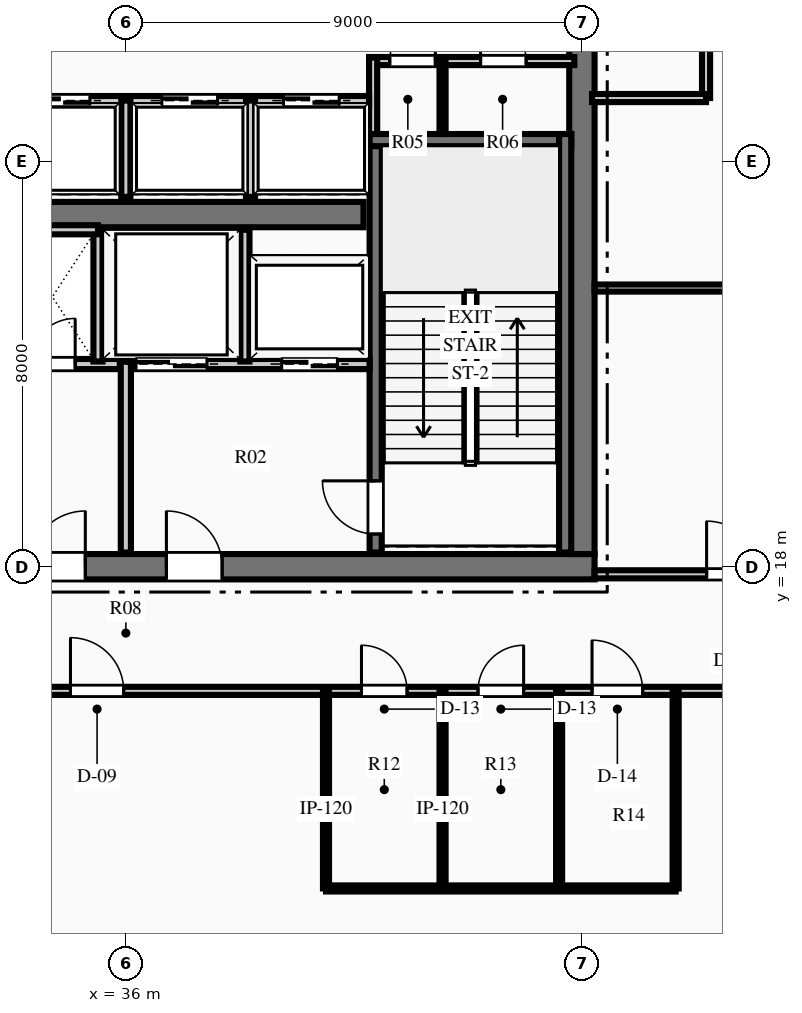
"""IFC4 building model, lengths in metres.
Left out: names, types, materials, properties, quantities, classifications, styles, units other than length and angle.
Written with IfcOpenShell. Run it as: python <this file> out.ifc"""

import sys

from ifc_helpers import new_model, si_unit, direction, frame, frame_2d, origin, place, context, subcontext, project, spatial, rectangle, extrude, element, fill, save


model = new_model("IFC4")
c1 = context("Model", 3, precision=1e-05, world=origin(), true_north=direction((0.0, 1.0)))
c2 = subcontext(c1, "Body", "Model", "MODEL_VIEW")
j1 = project(units=[si_unit("LENGTHUNIT", "METRE"), si_unit("PLANEANGLEUNIT", "RADIAN")], contexts=[c1])
p1 = place(None, origin())
s1 = spatial("IfcSite", under=j1, at=p1, CompositionType="ELEMENT")
p2 = place(p1, origin())
s2 = spatial("IfcBuilding", under=s1, at=p2, CompositionType="ELEMENT")
p3 = place(p2, frame((0.0, 0.0, 239.7)))
s3 = spatial("IfcBuildingStorey", under=s2, at=p3, CompositionType="ELEMENT", Elevation=239.7)
p4 = place(p3, frame((26.75, 18.0, 0.0), z_axis=(0.0, 0.0, 1.0), x_axis=(1.0, 0.0, 0.0)))
e1 = element("IfcWall", 1, at=p4, inside=s3, PredefinedType="SHEAR", context=c2, shape_type="SweptSolid", body=[
    extrude(rectangle(XDim=18.5, YDim=0.5, at=frame_2d((9.25, 0.0))), origin(), (0.0, 0.0, 1.0), 4.5),
])
p5 = place(p4, frame((7.35, 0.0, 0.0)))
e2 = element("IfcOpeningElement", 2, at=p5, cuts=e1, PredefinedType="OPENING", context=c2, shape_type="SweptSolid", body=[
    extrude(rectangle(XDim=1.1, YDim=2.15, at=frame_2d((0.55, 1.075))), frame((0.0, 0.26, 0.0), z_axis=(0.0, -1.0, 0.0), x_axis=(1.0, 0.0, 0.0)), (0.0, 0.0, 1.0), 0.52),
])
p6 = place(p4, frame((10.05, 0.0, 0.0)))
e3 = element("IfcOpeningElement", 3, at=p6, cuts=e1, PredefinedType="OPENING", context=c2, shape_type="SweptSolid", body=[
    extrude(rectangle(XDim=1.1, YDim=2.15, at=frame_2d((0.55, 1.075))), frame((0.0, 0.26, 0.0), z_axis=(0.0, -1.0, 0.0), x_axis=(1.0, 0.0, 0.0)), (0.0, 0.0, 1.0), 0.52),
])
p7 = place(p3, frame((45.0, 18.25, 0.0), z_axis=(0.0, 0.0, 1.0), x_axis=(0.0, 1.0, 0.0)))
e4 = element("IfcWall", 4, at=p7, inside=s3, PredefinedType="SHEAR", context=c2, shape_type="SweptSolid", body=[
    extrude(rectangle(XDim=15.5, YDim=0.5, at=frame_2d((7.75, 0.0))), origin(), (0.0, 0.0, 1.0), 4.5),
])
p8 = place(p7, frame((9.99, 0.0, 0.0)))
e5 = element("IfcOpeningElement", 5, at=p8, cuts=e4, PredefinedType="OPENING", context=c2, shape_type="SweptSolid", body=[
    extrude(rectangle(XDim=1.4, YDim=2.2, at=frame_2d((0.7, 1.1))), frame((0.0, 0.26, 0.0), z_axis=(0.0, -1.0, 0.0), x_axis=(1.0, 0.0, 0.0)), (0.0, 0.0, 1.0), 0.52),
])
p9 = place(p3, frame((31.31, 24.95, 0.0), z_axis=(0.0, 0.0, 1.0), x_axis=(1.0, 0.0, 0.0)))
e6 = element("IfcWall", 6, at=p9, inside=s3, PredefinedType="SHEAR", context=c2, shape_type="SweptSolid", body=[
    extrude(rectangle(XDim=9.38, YDim=0.5, at=frame_2d((4.69, 0.0))), origin(), (0.0, 0.0, 1.0), 4.5),
])
p10 = place(p3, frame((40.93, 18.28, 0.0), z_axis=(0.0, 0.0, 1.0), x_axis=(0.0, 1.0, 0.0)))
e7 = element("IfcWall", 7, at=p10, inside=s3, PredefinedType="SHEAR", context=c2, shape_type="SweptSolid", body=[
    extrude(rectangle(XDim=8.26, YDim=0.24, at=frame_2d((4.13, 0.0))), origin(), (0.0, 0.0, 1.0), 4.5),
])
p11 = place(p10, frame((0.365, 0.0, 0.0)))
e8 = element("IfcOpeningElement", 8, at=p11, cuts=e7, PredefinedType="OPENING", context=c2, shape_type="SweptSolid", body=[
    extrude(rectangle(XDim=1.05, YDim=2.15, at=frame_2d((0.525, 1.075))), frame((0.0, 0.13, 0.0), z_axis=(0.0, -1.0, 0.0), x_axis=(1.0, 0.0, 0.0)), (0.0, 0.0, 1.0), 0.26),
])
p12 = place(p3, frame((40.81, 26.42, 0.0), z_axis=(0.0, 0.0, 1.0), x_axis=(1.0, 0.0, 0.0)))
e9 = element("IfcWall", 9, at=p12, inside=s3, PredefinedType="SHEAR", context=c2, shape_type="SweptSolid", body=[
    extrude(rectangle(XDim=3.98, YDim=0.24, at=frame_2d((1.99, 0.0))), origin(), (0.0, 0.0, 1.0), 4.5),
])
p13 = place(p3, frame((44.67, 18.28, 0.0), z_axis=(0.0, 0.0, 1.0), x_axis=(0.0, 1.0, 0.0)))
e10 = element("IfcWall", 10, at=p13, inside=s3, PredefinedType="SHEAR", context=c2, shape_type="SweptSolid", body=[
    extrude(rectangle(XDim=8.26, YDim=0.24, at=frame_2d((4.13, 0.0))), origin(), (0.0, 0.0, 1.0), 4.5),
])
p14 = place(p3, frame((36.0, 18.28, 0.0), z_axis=(0.0, 0.0, 1.0), x_axis=(0.0, 1.0, 0.0)))
e11 = element("IfcWall", 11, at=p14, inside=s3, PredefinedType="PARTITIONING", context=c2, shape_type="SweptSolid", body=[
    extrude(rectangle(XDim=3.77, YDim=0.2, at=frame_2d((1.885, 0.0))), origin(), (0.0, 0.0, 1.0), 4.1),
])
p15 = place(p3, frame((31.19, 22.0, 0.0), z_axis=(0.0, 0.0, 1.0), x_axis=(1.0, 0.0, 0.0)))
e12 = element("IfcWall", 12, at=p15, inside=s3, PredefinedType="PARTITIONING", context=c2, shape_type="SweptSolid", body=[
    extrude(rectangle(XDim=4.69, YDim=0.2, at=frame_2d((2.345, 0.0))), origin(), (0.0, 0.0, 1.0), 4.1),
])
p16 = place(p15, frame((2.91, 0.0, 0.0)))
e13 = element("IfcOpeningElement", 13, at=p16, cuts=e12, PredefinedType="OPENING", context=c2, shape_type="SweptSolid", body=[
    extrude(rectangle(XDim=0.9, YDim=2.15, at=frame_2d((0.45, 1.075))), frame((0.0, 0.11, 0.0), z_axis=(0.0, -1.0, 0.0), x_axis=(1.0, 0.0, 0.0)), (0.0, 0.0, 1.0), 0.22),
])
p17 = place(p15, frame((0.635, 0.0, 0.0)))
e14 = element("IfcOpeningElement", 14, at=p17, cuts=e12, PredefinedType="OPENING", context=c2, shape_type="SweptSolid", body=[
    extrude(rectangle(XDim=1.1, YDim=2.15, at=frame_2d((0.55, 1.075))), frame((0.0, 0.11, 0.0), z_axis=(0.0, -1.0, 0.0), x_axis=(1.0, 0.0, 0.0)), (0.0, 0.0, 1.0), 0.22),
])
p18 = place(p3, frame((36.12, 22.0, 0.0), z_axis=(0.0, 0.0, 1.0), x_axis=(1.0, 0.0, 0.0)))
e15 = element("IfcWall", 15, at=p18, inside=s3, PredefinedType="PARTITIONING", context=c2, shape_type="SweptSolid", body=[
    extrude(rectangle(XDim=4.69, YDim=0.2, at=frame_2d((2.345, 0.0))), origin(), (0.0, 0.0, 1.0), 4.1),
])
p19 = place(p18, frame((2.955, 0.0, 0.0)))
e16 = element("IfcOpeningElement", 16, at=p19, cuts=e15, PredefinedType="OPENING", context=c2, shape_type="SweptSolid", body=[
    extrude(rectangle(XDim=1.1, YDim=2.15, at=frame_2d((0.55, 1.075))), frame((0.0, 0.11, 0.0), z_axis=(0.0, -1.0, 0.0), x_axis=(1.0, 0.0, 0.0)), (0.0, 0.0, 1.0), 0.22),
])
p20 = place(p18, frame((0.08, 0.0, 0.0)))
e17 = element("IfcOpeningElement", 17, at=p20, cuts=e15, PredefinedType="OPENING", context=c2, shape_type="SweptSolid", body=[
    extrude(rectangle(XDim=1.4, YDim=2.2, at=frame_2d((0.7, 1.1))), frame((0.0, 0.11, 0.0), z_axis=(0.0, -1.0, 0.0), x_axis=(1.0, 0.0, 0.0)), (0.0, 0.0, 1.0), 0.22),
])
p21 = place(p3, frame((35.45, 22.05, 0.0), z_axis=(0.0, 0.0, 1.0), x_axis=(0.0, 1.0, 0.0)))
e18 = element("IfcWall", 18, at=p21, inside=s3, PredefinedType="PARTITIONING", context=c2, shape_type="SweptSolid", body=[
    extrude(rectangle(XDim=2.6, YDim=0.18, at=frame_2d((1.3, 0.0))), origin(), (0.0, 0.0, 1.0), 4.1),
])
p22 = place(p3, frame((33.65, 24.65, 0.0), z_axis=(0.0, 0.0, 1.0), x_axis=(1.0, 0.0, 0.0)))
e19 = element("IfcWall", 19, at=p22, inside=s3, PredefinedType="PARTITIONING", context=c2, shape_type="SweptSolid", body=[
    extrude(rectangle(XDim=1.8, YDim=0.18, at=frame_2d((0.9, 0.0))), origin(), (0.0, 0.0, 1.0), 4.1),
])
p23 = place(p3, frame((38.35, 22.05, 0.0), z_axis=(0.0, 0.0, 1.0), x_axis=(0.0, 1.0, 0.0)))
e20 = element("IfcWall", 20, at=p23, inside=s3, PredefinedType="PARTITIONING", context=c2, shape_type="SweptSolid", body=[
    extrude(rectangle(XDim=2.6, YDim=0.18, at=frame_2d((1.3, 0.0))), origin(), (0.0, 0.0, 1.0), 4.1),
])
p24 = place(p3, frame((40.8, 27.98, 0.0), z_axis=(0.0, 0.0, 1.0), x_axis=(1.0, 0.0, 0.0)))
e21 = element("IfcWall", 21, at=p24, inside=s3, PredefinedType="PARTITIONING", context=c2, shape_type="SweptSolid", body=[
    extrude(rectangle(XDim=4.05, YDim=0.16, at=frame_2d((2.025, 0.0))), origin(), (0.0, 0.0, 1.0), 4.1),
])
p25 = place(p24, frame((0.407, 0.0, 0.0)))
e22 = element("IfcOpeningElement", 22, at=p25, cuts=e21, PredefinedType="OPENING", context=c2, shape_type="SweptSolid", body=[
    extrude(rectangle(XDim=0.9, YDim=2.15, at=frame_2d((0.45, 1.075))), frame((0.0, 0.09, 0.0), z_axis=(0.0, -1.0, 0.0), x_axis=(1.0, 0.0, 0.0)), (0.0, 0.0, 1.0), 0.18),
])
p26 = place(p24, frame((2.2, 0.0, 0.0)))
e23 = element("IfcOpeningElement", 23, at=p26, cuts=e21, PredefinedType="OPENING", context=c2, shape_type="SweptSolid", body=[
    extrude(rectangle(XDim=0.9, YDim=2.15, at=frame_2d((0.45, 1.075))), frame((0.0, 0.09, 0.0), z_axis=(0.0, -1.0, 0.0), x_axis=(1.0, 0.0, 0.0)), (0.0, 0.0, 1.0), 0.18),
])
p27 = place(p3, frame((40.88, 26.54, 0.0), z_axis=(0.0, 0.0, 1.0), x_axis=(0.0, 1.0, 0.0)))
e24 = element("IfcWall", 24, at=p27, inside=s3, PredefinedType="PARTITIONING", context=c2, shape_type="SweptSolid", body=[
    extrude(rectangle(XDim=1.51, YDim=0.16, at=frame_2d((0.755, 0.0))), origin(), (0.0, 0.0, 1.0), 4.1),
])
p28 = place(p3, frame((42.25, 26.54, 0.0), z_axis=(0.0, 0.0, 1.0), x_axis=(0.0, 1.0, 0.0)))
e25 = element("IfcWall", 25, at=p28, inside=s3, PredefinedType="PARTITIONING", context=c2, shape_type="SweptSolid", body=[
    extrude(rectangle(XDim=1.44, YDim=0.12, at=frame_2d((0.72, 0.0))), origin(), (0.0, 0.0, 1.0), 4.1),
])
p29 = place(p3, frame((31.2, 27.2, 0.0), z_axis=(0.0, 0.0, 1.0), x_axis=(1.0, 0.0, 0.0)))
e26 = element("IfcWall", 26, at=p29, inside=s3, PredefinedType="PARTITIONING", context=c2, shape_type="SweptSolid", body=[
    extrude(rectangle(XDim=9.6, YDim=0.18, at=frame_2d((4.8, 0.0))), origin(), (0.0, 0.0, 1.0), 4.1),
])
p30 = place(p29, frame((0.59, 0.0, 0.0)))
e27 = element("IfcOpeningElement", 27, at=p30, cuts=e26, PredefinedType="OPENING", context=c2, shape_type="SweptSolid", body=[
    extrude(rectangle(XDim=1.1, YDim=2.15, at=frame_2d((0.55, 1.075))), frame((0.0, 0.1, 0.0), z_axis=(0.0, -1.0, 0.0), x_axis=(1.0, 0.0, 0.0)), (0.0, 0.0, 1.0), 0.2),
])
p31 = place(p29, frame((2.99, 0.0, 0.0)))
e28 = element("IfcOpeningElement", 28, at=p31, cuts=e26, PredefinedType="OPENING", context=c2, shape_type="SweptSolid", body=[
    extrude(rectangle(XDim=1.1, YDim=2.15, at=frame_2d((0.55, 1.075))), frame((0.0, 0.1, 0.0), z_axis=(0.0, -1.0, 0.0), x_axis=(1.0, 0.0, 0.0)), (0.0, 0.0, 1.0), 0.2),
])
p32 = place(p29, frame((5.51, 0.0, 0.0)))
e29 = element("IfcOpeningElement", 29, at=p32, cuts=e26, PredefinedType="OPENING", context=c2, shape_type="SweptSolid", body=[
    extrude(rectangle(XDim=1.1, YDim=2.15, at=frame_2d((0.55, 1.075))), frame((0.0, 0.1, 0.0), z_axis=(0.0, -1.0, 0.0), x_axis=(1.0, 0.0, 0.0)), (0.0, 0.0, 1.0), 0.2),
])
p33 = place(p29, frame((7.91, 0.0, 0.0)))
e30 = element("IfcOpeningElement", 30, at=p33, cuts=e26, PredefinedType="OPENING", context=c2, shape_type="SweptSolid", body=[
    extrude(rectangle(XDim=1.1, YDim=2.15, at=frame_2d((0.55, 1.075))), frame((0.0, 0.1, 0.0), z_axis=(0.0, -1.0, 0.0), x_axis=(1.0, 0.0, 0.0)), (0.0, 0.0, 1.0), 0.2),
])
for number, where, z_axis, x_axis in (
    (31, (36.0, 25.3, 0.0), (0.0, 0.0, 1.0), (0.0, 1.0, 0.0)),
    (32, (38.46, 25.3, 0.0), (0.0, 0.0, 1.0), (0.0, 1.0, 0.0)),
):
    element("IfcWall", number, at=place(p3, frame(where, z_axis=z_axis, x_axis=x_axis)), inside=s3, PredefinedType="PARTITIONING", context=c2, shape_type="SweptSolid", body=[
        extrude(rectangle(XDim=1.9, YDim=0.18, at=frame_2d((0.95, 0.0))), origin(), (0.0, 0.0, 1.0), 4.1),
    ])
p34 = place(p3, frame((18.2, 15.55, 0.0), z_axis=(0.0, 0.0, 1.0), x_axis=(1.0, 0.0, 0.0)))
e33 = element("IfcWall", 33, at=p34, inside=s3, PredefinedType="PARTITIONING", context=c2, shape_type="SweptSolid", body=[
    extrude(rectangle(XDim=35.6, YDim=0.16, at=frame_2d((17.8, 0.0))), origin(), (0.0, 0.0, 1.0), 2.595),
])
p35 = place(p34, frame((22.45, 0.0, 0.0)))
e34 = element("IfcOpeningElement", 34, at=p35, cuts=e33, PredefinedType="OPENING", context=c2, shape_type="SweptSolid", body=[
    extrude(rectangle(XDim=0.9, YDim=2.15, at=frame_2d((0.45, 1.075))), frame((0.0, 0.09, 0.0), z_axis=(0.0, -1.0, 0.0), x_axis=(1.0, 0.0, 0.0)), (0.0, 0.0, 1.0), 0.18),
])
p36 = place(p34, frame((24.75, 0.0, 0.0)))
e35 = element("IfcOpeningElement", 35, at=p36, cuts=e33, PredefinedType="OPENING", context=c2, shape_type="SweptSolid", body=[
    extrude(rectangle(XDim=0.9, YDim=2.15, at=frame_2d((0.45, 1.075))), frame((0.0, 0.09, 0.0), z_axis=(0.0, -1.0, 0.0), x_axis=(1.0, 0.0, 0.0)), (0.0, 0.0, 1.0), 0.18),
])
p37 = place(p34, frame((27.0, 0.0, 0.0)))
e36 = element("IfcOpeningElement", 36, at=p37, cuts=e33, PredefinedType="OPENING", context=c2, shape_type="SweptSolid", body=[
    extrude(rectangle(XDim=1.0, YDim=2.15, at=frame_2d((0.5, 1.075))), frame((0.0, 0.09, 0.0), z_axis=(0.0, -1.0, 0.0), x_axis=(1.0, 0.0, 0.0)), (0.0, 0.0, 1.0), 0.18),
])
p38 = place(p34, frame((4.207, 0.0, 0.0)))
e37 = element("IfcOpeningElement", 37, at=p38, cuts=e33, PredefinedType="OPENING", context=c2, shape_type="SweptSolid", body=[
    extrude(rectangle(XDim=1.05, YDim=2.15, at=frame_2d((0.525, 1.075))), frame((0.0, 0.09, 0.0), z_axis=(0.0, -1.0, 0.0), x_axis=(1.0, 0.0, 0.0)), (0.0, 0.0, 1.0), 0.18),
])
p39 = place(p34, frame((16.707, 0.0, 0.0)))
e38 = element("IfcOpeningElement", 38, at=p39, cuts=e33, PredefinedType="OPENING", context=c2, shape_type="SweptSolid", body=[
    extrude(rectangle(XDim=1.05, YDim=2.15, at=frame_2d((0.525, 1.075))), frame((0.0, 0.09, 0.0), z_axis=(0.0, -1.0, 0.0), x_axis=(1.0, 0.0, 0.0)), (0.0, 0.0, 1.0), 0.18),
])
p40 = place(p3, frame((45.25, 17.85, 0.0), z_axis=(0.0, 0.0, 1.0), x_axis=(1.0, 0.0, 0.0)))
e39 = element("IfcWall", 39, at=p40, inside=s3, PredefinedType="PARTITIONING", context=c2, shape_type="SweptSolid", body=[
    extrude(rectangle(XDim=8.55, YDim=0.16, at=frame_2d((4.275, 0.0))), origin(), (0.0, 0.0, 1.0), 4.1),
])
p41 = place(p40, frame((2.211, 0.0, 0.0)))
e40 = element("IfcOpeningElement", 40, at=p41, cuts=e39, PredefinedType="OPENING", context=c2, shape_type="SweptSolid", body=[
    extrude(rectangle(XDim=1.05, YDim=2.15, at=frame_2d((0.525, 1.075))), frame((0.0, 0.09, 0.0), z_axis=(0.0, -1.0, 0.0), x_axis=(1.0, 0.0, 0.0)), (0.0, 0.0, 1.0), 0.18),
])
p42 = place(p3, frame((47.45, 27.25, 0.0), z_axis=(0.0, 0.0, 1.0), x_axis=(0.0, 1.0, 0.0)))
e41 = element("IfcWall", 41, at=p42, inside=s3, PredefinedType="PARTITIONING", context=c2, shape_type="SweptSolid", body=[
    extrude(rectangle(XDim=6.9, YDim=0.16, at=frame_2d((3.45, 0.0))), origin(), (0.0, 0.0, 1.0), 4.1),
])
p43 = place(p42, frame((1.683, 0.0, 0.0)))
e42 = element("IfcOpeningElement", 42, at=p43, cuts=e41, PredefinedType="OPENING", context=c2, shape_type="SweptSolid", body=[
    extrude(rectangle(XDim=1.05, YDim=2.15, at=frame_2d((0.525, 1.075))), frame((0.0, 0.09, 0.0), z_axis=(0.0, -1.0, 0.0), x_axis=(1.0, 0.0, 0.0)), (0.0, 0.0, 1.0), 0.18),
])
p44 = place(p3, frame((45.2, 27.25, 0.0), z_axis=(0.0, 0.0, 1.0), x_axis=(1.0, 0.0, 0.0)))
e43 = element("IfcWall", 43, at=p44, inside=s3, PredefinedType="PARTITIONING", context=c2, shape_type="SweptSolid", body=[
    extrude(rectangle(XDim=2.25, YDim=0.16, at=frame_2d((1.125, 0.0))), origin(), (0.0, 0.0, 1.0), 4.1),
])
for number, where, z_axis, x_axis in (
    (44, (39.95, 11.65, 0.0), (0.0, 0.0, 1.0), (0.0, 1.0, 0.0)),
    (45, (42.25, 11.65, 0.0), (0.0, 0.0, 1.0), (0.0, 1.0, 0.0)),
    (46, (44.55, 11.65, 0.0), (0.0, 0.0, 1.0), (0.0, 1.0, 0.0)),
    (47, (46.85, 11.65, 0.0), (0.0, 0.0, 1.0), (0.0, 1.0, 0.0)),
):
    element("IfcWall", number, at=place(p3, frame(where, z_axis=z_axis, x_axis=x_axis)), inside=s3, PredefinedType="PARTITIONING", context=c2, shape_type="SweptSolid", body=[
        extrude(rectangle(XDim=3.9, YDim=0.12, at=frame_2d((1.95, 0.0))), origin(), (0.0, 0.0, 1.0), 4.1),
    ])
p45 = place(p3, frame((39.95, 11.65, 0.0), z_axis=(0.0, 0.0, 1.0), x_axis=(1.0, 0.0, 0.0)))
e48 = element("IfcWall", 48, at=p45, inside=s3, PredefinedType="PARTITIONING", context=c2, shape_type="SweptSolid", body=[
    extrude(rectangle(XDim=6.9, YDim=0.12, at=frame_2d((3.45, 0.0))), origin(), (0.0, 0.0, 1.0), 4.1),
])
p46 = place(p3, frame((45.25, 23.5, 0.0), z_axis=(0.0, 0.0, 1.0), x_axis=(1.0, 0.0, 0.0)))
e49 = element("IfcWall", 49, at=p46, inside=s3, PredefinedType="PARTITIONING", context=c2, shape_type="SweptSolid", body=[
    extrude(rectangle(XDim=15.565, YDim=0.14, at=frame_2d((7.783, 0.0))), origin(), (0.0, 0.0, 1.0), 4.1),
])
p47 = place(p25, origin())
e50 = element("IfcDoor", 50, at=p47, inside=s3, OperationType="SINGLE_SWING_RIGHT", PredefinedType="DOOR", context=c2, shape_type="SweptSolid", body=[
    extrude(rectangle(XDim=0.9, YDim=2.15, at=frame_2d((0.45, 1.075))), frame((0.0, 0.025, 0.0), z_axis=(0.0, -1.0, 0.0), x_axis=(1.0, 0.0, 0.0)), (0.0, 0.0, 1.0), 0.05),
])
fill(e22, e50)
p48 = place(p26, origin())
e51 = element("IfcDoor", 51, at=p48, inside=s3, OperationType="SINGLE_SWING_LEFT", PredefinedType="DOOR", context=c2, shape_type="SweptSolid", body=[
    extrude(rectangle(XDim=0.9, YDim=2.15, at=frame_2d((0.45, 1.075))), frame((0.0, 0.025, 0.0), z_axis=(0.0, -1.0, 0.0), x_axis=(1.0, 0.0, 0.0)), (0.0, 0.0, 1.0), 0.05),
])
fill(e23, e51)
p49 = place(p11, origin())
e52 = element("IfcDoor", 52, at=p49, inside=s3, OperationType="SINGLE_SWING_RIGHT", PredefinedType="DOOR", context=c2, shape_type="SweptSolid", body=[
    extrude(rectangle(XDim=1.05, YDim=2.15, at=frame_2d((0.525, 1.075))), frame((0.0, 0.025, 0.0), z_axis=(0.0, -1.0, 0.0), x_axis=(1.0, 0.0, 0.0)), (0.0, 0.0, 1.0), 0.05),
])
fill(e8, e52)
p50 = place(p5, origin())
e53 = element("IfcDoor", 53, at=p50, inside=s3, OperationType="SINGLE_SWING_RIGHT", PredefinedType="DOOR", context=c2, shape_type="SweptSolid", body=[
    extrude(rectangle(XDim=1.1, YDim=2.15, at=frame_2d((0.55, 1.075))), frame((0.0, 0.025, 0.0), z_axis=(0.0, -1.0, 0.0), x_axis=(1.0, 0.0, 0.0)), (0.0, 0.0, 1.0), 0.05),
])
fill(e2, e53)
p51 = place(p6, origin())
e54 = element("IfcDoor", 54, at=p51, inside=s3, OperationType="SINGLE_SWING_LEFT", PredefinedType="DOOR", context=c2, shape_type="SweptSolid", body=[
    extrude(rectangle(XDim=1.1, YDim=2.15, at=frame_2d((0.55, 1.075))), frame((0.0, 0.025, 0.0), z_axis=(0.0, -1.0, 0.0), x_axis=(1.0, 0.0, 0.0)), (0.0, 0.0, 1.0), 0.05),
])
fill(e3, e54)
p52 = place(p16, origin())
e55 = element("IfcDoor", 55, at=p52, inside=s3, OperationType="SINGLE_SWING_RIGHT", PredefinedType="DOOR", context=c2, shape_type="SweptSolid", body=[
    extrude(rectangle(XDim=0.9, YDim=2.15, at=frame_2d((0.45, 1.075))), frame((0.0, 0.025, 0.0), z_axis=(0.0, -1.0, 0.0), x_axis=(1.0, 0.0, 0.0)), (0.0, 0.0, 1.0), 0.05),
])
fill(e13, e55)
p53 = place(p35, origin())
e56 = element("IfcDoor", 56, at=p53, inside=s3, OperationType="SINGLE_SWING_LEFT", PredefinedType="DOOR", context=c2, shape_type="SweptSolid", body=[
    extrude(rectangle(XDim=0.9, YDim=2.15, at=frame_2d((0.45, 1.075))), frame((0.0, 0.025, 0.0), z_axis=(0.0, -1.0, 0.0), x_axis=(1.0, 0.0, 0.0)), (0.0, 0.0, 1.0), 0.05),
])
fill(e34, e56)
p54 = place(p36, origin())
e57 = element("IfcDoor", 57, at=p54, inside=s3, OperationType="SINGLE_SWING_RIGHT", PredefinedType="DOOR", context=c2, shape_type="SweptSolid", body=[
    extrude(rectangle(XDim=0.9, YDim=2.15, at=frame_2d((0.45, 1.075))), frame((0.0, 0.025, 0.0), z_axis=(0.0, -1.0, 0.0), x_axis=(1.0, 0.0, 0.0)), (0.0, 0.0, 1.0), 0.05),
])
fill(e35, e57)
p55 = place(p37, origin())
e58 = element("IfcDoor", 58, at=p55, inside=s3, OperationType="SINGLE_SWING_LEFT", PredefinedType="DOOR", context=c2, shape_type="SweptSolid", body=[
    extrude(rectangle(XDim=1.0, YDim=2.15, at=frame_2d((0.5, 1.075))), frame((0.0, 0.025, 0.0), z_axis=(0.0, -1.0, 0.0), x_axis=(1.0, 0.0, 0.0)), (0.0, 0.0, 1.0), 0.05),
])
fill(e36, e58)
p56 = place(p39, origin())
e59 = element("IfcDoor", 59, at=p56, inside=s3, OperationType="SINGLE_SWING_LEFT", PredefinedType="DOOR", context=c2, shape_type="SweptSolid", body=[
    extrude(rectangle(XDim=1.05, YDim=2.15, at=frame_2d((0.525, 1.075))), frame((0.0, 0.025, 0.0), z_axis=(0.0, -1.0, 0.0), x_axis=(1.0, 0.0, 0.0)), (0.0, 0.0, 1.0), 0.05),
])
fill(e38, e59)
p57 = place(p41, origin())
e60 = element("IfcDoor", 60, at=p57, inside=s3, OperationType="SINGLE_SWING_LEFT", PredefinedType="DOOR", context=c2, shape_type="SweptSolid", body=[
    extrude(rectangle(XDim=1.05, YDim=2.15, at=frame_2d((0.525, 1.075))), frame((0.0, 0.025, 0.0), z_axis=(0.0, -1.0, 0.0), x_axis=(1.0, 0.0, 0.0)), (0.0, 0.0, 1.0), 0.05),
])
fill(e40, e60)
p58 = place(p31, origin())
e61 = element("IfcDoor", 61, at=p58, inside=s3, OperationType="SLIDING_TO_LEFT", PredefinedType="DOOR", context=c2, shape_type="SweptSolid", body=[
    extrude(rectangle(XDim=1.1, YDim=2.15, at=frame_2d((0.55, 1.075))), frame((0.0, 0.025, 0.0), z_axis=(0.0, -1.0, 0.0), x_axis=(1.0, 0.0, 0.0)), (0.0, 0.0, 1.0), 0.05),
])
fill(e28, e61)
p59 = place(p32, origin())
e62 = element("IfcDoor", 62, at=p59, inside=s3, OperationType="SLIDING_TO_LEFT", PredefinedType="DOOR", context=c2, shape_type="SweptSolid", body=[
    extrude(rectangle(XDim=1.1, YDim=2.15, at=frame_2d((0.55, 1.075))), frame((0.0, 0.025, 0.0), z_axis=(0.0, -1.0, 0.0), x_axis=(1.0, 0.0, 0.0)), (0.0, 0.0, 1.0), 0.05),
])
fill(e29, e62)
p60 = place(p33, origin())
e63 = element("IfcDoor", 63, at=p60, inside=s3, OperationType="SLIDING_TO_LEFT", PredefinedType="DOOR", context=c2, shape_type="SweptSolid", body=[
    extrude(rectangle(XDim=1.1, YDim=2.15, at=frame_2d((0.55, 1.075))), frame((0.0, 0.025, 0.0), z_axis=(0.0, -1.0, 0.0), x_axis=(1.0, 0.0, 0.0)), (0.0, 0.0, 1.0), 0.05),
])
fill(e30, e63)
p61 = place(p19, origin())
e64 = element("IfcDoor", 64, at=p61, inside=s3, OperationType="SLIDING_TO_LEFT", PredefinedType="DOOR", context=c2, shape_type="SweptSolid", body=[
    extrude(rectangle(XDim=1.1, YDim=2.15, at=frame_2d((0.55, 1.075))), frame((0.0, 0.025, 0.0), z_axis=(0.0, -1.0, 0.0), x_axis=(1.0, 0.0, 0.0)), (0.0, 0.0, 1.0), 0.05),
])
fill(e16, e64)
p62 = place(p20, origin())
e65 = element("IfcDoor", 65, at=p62, inside=s3, OperationType="SLIDING_TO_LEFT", PredefinedType="DOOR", context=c2, shape_type="SweptSolid", body=[
    extrude(rectangle(XDim=1.4, YDim=2.2, at=frame_2d((0.7, 1.1))), frame((0.0, 0.025, 0.0), z_axis=(0.0, -1.0, 0.0), x_axis=(1.0, 0.0, 0.0)), (0.0, 0.0, 1.0), 0.05),
])
fill(e17, e65)
save(model, sys.argv[1])
